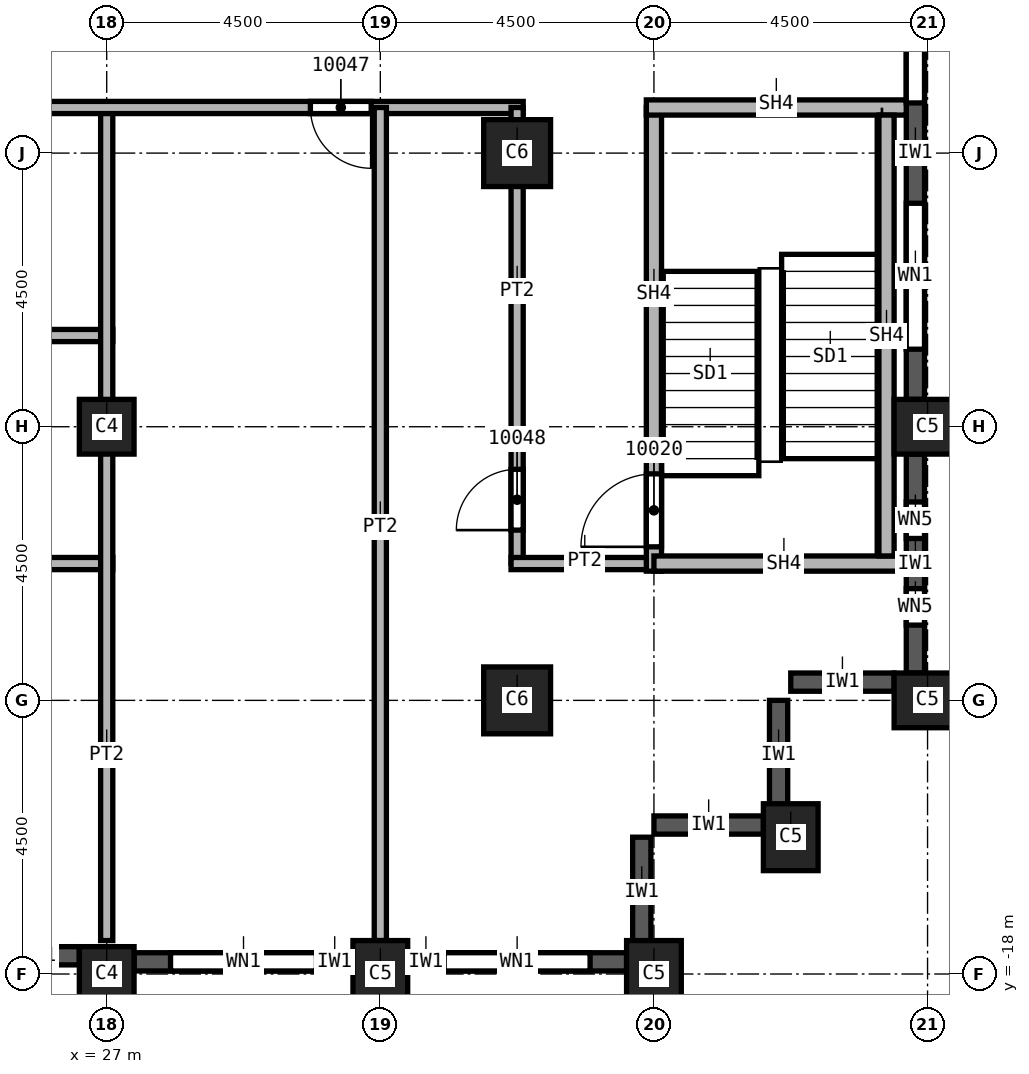
"""IFC4 building model, lengths in metres.
Left out: names, types, materials, properties, quantities, classifications, styles, units other than length and angle.
Written with IfcOpenShell. Run it as: python <this file> out.ifc"""

import sys

from ifc_helpers import new_model, si_unit, direction, frame, frame_2d, origin, origin_2d, place, context, subcontext, project, spatial, rectangle, extrude, element, fill, save


model = new_model("IFC4")
c1 = context("Model", 3, precision=1e-05, world=origin(), true_north=direction((0.0, 1.0)))
c2 = subcontext(c1, "Body", "Model", "MODEL_VIEW")
j1 = project(units=[si_unit("LENGTHUNIT", "METRE"), si_unit("PLANEANGLEUNIT", "RADIAN")], contexts=[c1])
p1 = place(None, origin())
s1 = spatial("IfcSite", under=j1, at=p1, CompositionType="ELEMENT")
p2 = place(p1, origin())
s2 = spatial("IfcBuilding", under=s1, at=p2, CompositionType="ELEMENT")
p3 = place(p2, frame((0.0, 0.0, 170.0)))
s3 = spatial("IfcBuildingStorey", under=s2, at=p3, CompositionType="ELEMENT", Elevation=170.0)
for number, where, z_axis, x_axis in (
    (1, (40.5, -9.0, 0.0), (0.0, 0.0, 1.0), (0.0, 1.0, 0.0)),
    (2, (40.5, -13.5, 0.0), (0.0, 0.0, 1.0), (0.0, 1.0, 0.0)),
    (3, (38.25, -15.75, 0.0), (0.0, 0.0, 1.0), (1.0, 0.0, 0.0)),
    (4, (31.5, -18.0, 0.0), (0.0, 0.0, 1.0), (1.0, 0.0, 0.0)),
    (5, (36.0, -18.0, 0.0), (0.0, 0.0, 1.0), (1.0, 0.0, 0.0)),
):
    element("IfcColumn", number, at=place(p3, frame(where, z_axis=z_axis, x_axis=x_axis)), inside=s3, PredefinedType="COLUMN", context=c2, shape_type="SweptSolid", body=[
        extrude(rectangle(XDim=0.9, YDim=1.1, at=origin_2d()), origin(), (0.0, 0.0, 1.0), 3.7),
    ])
for number, where, z_axis, x_axis in (
    (6, (33.75, -4.5, 0.0), (0.0, 0.0, 1.0), (1.0, 0.0, 0.0)),
    (7, (33.75, -13.5, 0.0), (0.0, 0.0, 1.0), (1.0, 0.0, 0.0)),
):
    element("IfcColumn", number, at=place(p3, frame(where, z_axis=z_axis, x_axis=x_axis)), inside=s3, PredefinedType="COLUMN", context=c2, shape_type="SweptSolid", body=[
        extrude(rectangle(XDim=1.1, YDim=1.1, at=origin_2d()), origin(), (0.0, 0.0, 1.0), 3.7),
    ])
for number, where, z_axis, x_axis in (
    (8, (27.0, -9.0, 0.0), (0.0, 0.0, 1.0), (1.0, 0.0, 0.0)),
    (9, (27.0, -18.0, 0.0), (0.0, 0.0, 1.0), (1.0, 0.0, 0.0)),
):
    element("IfcColumn", number, at=place(p3, frame(where, z_axis=z_axis, x_axis=x_axis)), inside=s3, PredefinedType="COLUMN", context=c2, shape_type="SweptSolid", body=[
        extrude(rectangle(XDim=0.9, YDim=0.9, at=origin_2d()), origin(), (0.0, 0.0, 1.0), 3.7),
    ])
for number, where, z_axis, x_axis in (
    (10, (35.8, -17.55, 0.0), (0.0, 0.0, 1.0), (0.0, 1.0, 0.0)),
    (11, (37.8, -15.55, 0.0), (0.0, 0.0, 1.0), (-1.0, 0.0, 0.0)),
    (12, (38.05, -15.3, 0.0), (0.0, 0.0, 1.0), (0.0, 1.0, 0.0)),
):
    element("IfcWall", number, at=place(p3, frame(where, z_axis=z_axis, x_axis=x_axis)), inside=s3, PredefinedType="SOLIDWALL", context=c2, shape_type="SweptSolid", body=[
        extrude(rectangle(XDim=1.8, YDim=0.3, at=frame_2d((0.9, 0.0))), origin(), (0.0, 0.0, 1.0), 3.1),
    ])
p4 = place(p3, frame((39.95, -13.2, 0.0), z_axis=(0.0, 0.0, 1.0), x_axis=(-1.0, 0.0, 0.0)))
e13 = element("IfcWall", 13, at=p4, inside=s3, PredefinedType="SOLIDWALL", context=c2, shape_type="SweptSolid", body=[
    extrude(rectangle(XDim=1.7, YDim=0.3, at=frame_2d((0.85, 0.0))), origin(), (0.0, 0.0, 1.0), 3.1),
])
p5 = place(p3, frame((25.2, -17.7, 0.0), z_axis=(0.0, 0.0, 1.0), x_axis=(1.0, 0.0, 0.0)))
e14 = element("IfcWall", 14, at=p5, inside=s3, PredefinedType="SOLIDWALL", context=c2, shape_type="SweptSolid", body=[
    extrude(rectangle(XDim=1.35, YDim=0.3, at=frame_2d((0.675, 0.0))), origin(), (0.0, 0.0, 1.0), 3.1),
])
p6 = place(p3, frame((27.45, -17.8, 0.0), z_axis=(0.0, 0.0, 1.0), x_axis=(1.0, 0.0, 0.0)))
e15 = element("IfcWall", 15, at=p6, inside=s3, PredefinedType="SOLIDWALL", context=c2, shape_type="SweptSolid", body=[
    extrude(rectangle(XDim=3.6, YDim=0.3, at=frame_2d((1.8, 0.0))), origin(), (0.0, 0.0, 1.0), 3.1),
])
p7 = place(p6, frame((0.6, 0.0, 0.8)))
e16 = element("IfcOpeningElement", 16, at=p7, cuts=e15, PredefinedType="OPENING", context=c2, shape_type="SweptSolid", body=[
    extrude(rectangle(XDim=2.4, YDim=1.95, at=frame_2d((1.2, 0.975))), frame((0.0, 0.15, 0.0), z_axis=(0.0, -1.0, 0.0), x_axis=(1.0, 0.0, 0.0)), (0.0, 0.0, 1.0), 0.3),
])
p8 = place(p3, frame((31.95, -17.8, 0.0), z_axis=(0.0, 0.0, 1.0), x_axis=(1.0, 0.0, 0.0)))
e17 = element("IfcWall", 17, at=p8, inside=s3, PredefinedType="SOLIDWALL", context=c2, shape_type="SweptSolid", body=[
    extrude(rectangle(XDim=3.6, YDim=0.3, at=frame_2d((1.8, 0.0))), origin(), (0.0, 0.0, 1.0), 3.1),
])
p9 = place(p8, frame((0.6, 0.0, 0.8)))
e18 = element("IfcOpeningElement", 18, at=p9, cuts=e17, PredefinedType="OPENING", context=c2, shape_type="SweptSolid", body=[
    extrude(rectangle(XDim=2.4, YDim=1.95, at=frame_2d((1.2, 0.975))), frame((0.0, 0.15, 0.0), z_axis=(0.0, -1.0, 0.0), x_axis=(1.0, 0.0, 0.0)), (0.0, 0.0, 1.0), 0.3),
])
p10 = place(p3, frame((40.3, -13.05, 0.0), z_axis=(0.0, 0.0, 1.0), x_axis=(0.0, 1.0, 0.0)))
e19 = element("IfcWall", 19, at=p10, inside=s3, PredefinedType="SOLIDWALL", context=c2, shape_type="SweptSolid", body=[
    extrude(rectangle(XDim=3.6, YDim=0.3, at=frame_2d((1.8, 0.0))), origin(), (0.0, 0.0, 1.0), 3.1),
])
p11 = place(p10, frame((0.788, 0.0, 0.8)))
e20 = element("IfcOpeningElement", 20, at=p11, cuts=e19, PredefinedType="OPENING", context=c2, shape_type="SweptSolid", body=[
    extrude(rectangle(XDim=0.6, YDim=1.95, at=frame_2d((0.3, 0.975))), frame((0.0, 0.15, 0.0), z_axis=(0.0, -1.0, 0.0), x_axis=(1.0, 0.0, 0.0)), (0.0, 0.0, 1.0), 0.3),
])
p12 = place(p10, frame((2.212, 0.0, 0.8)))
e21 = element("IfcOpeningElement", 21, at=p12, cuts=e19, PredefinedType="OPENING", context=c2, shape_type="SweptSolid", body=[
    extrude(rectangle(XDim=0.6, YDim=1.95, at=frame_2d((0.3, 0.975))), frame((0.0, 0.15, 0.0), z_axis=(0.0, -1.0, 0.0), x_axis=(1.0, 0.0, 0.0)), (0.0, 0.0, 1.0), 0.3),
])
p13 = place(p3, frame((40.3, -8.55, 0.0), z_axis=(0.0, 0.0, 1.0), x_axis=(0.0, 1.0, 0.0)))
e22 = element("IfcWall", 22, at=p13, inside=s3, PredefinedType="SOLIDWALL", context=c2, shape_type="SweptSolid", body=[
    extrude(rectangle(XDim=8.1, YDim=0.3, at=frame_2d((4.05, 0.0))), origin(), (0.0, 0.0, 1.0), 3.1),
])
p14 = place(p13, frame((0.825, 0.0, 0.8)))
e23 = element("IfcOpeningElement", 23, at=p14, cuts=e22, PredefinedType="OPENING", context=c2, shape_type="SweptSolid", body=[
    extrude(rectangle(XDim=2.4, YDim=1.95, at=frame_2d((1.2, 0.975))), frame((0.0, 0.15, 0.0), z_axis=(0.0, -1.0, 0.0), x_axis=(1.0, 0.0, 0.0)), (0.0, 0.0, 1.0), 0.3),
])
p15 = place(p13, frame((4.875, 0.0, 0.8)))
e24 = element("IfcOpeningElement", 24, at=p15, cuts=e22, PredefinedType="OPENING", context=c2, shape_type="SweptSolid", body=[
    extrude(rectangle(XDim=2.4, YDim=1.95, at=frame_2d((1.2, 0.975))), frame((0.0, 0.15, 0.0), z_axis=(0.0, -1.0, 0.0), x_axis=(1.0, 0.0, 0.0)), (0.0, 0.0, 1.0), 0.3),
])
for number, where, z_axis, x_axis in (
    (25, (15.4, -11.25, 0.0), (0.0, 0.0, 1.0), (1.0, 0.0, 0.0)),
    (26, (15.4, -7.5, 0.0), (0.0, 0.0, 1.0), (1.0, 0.0, 0.0)),
):
    element("IfcWall", number, at=place(p3, frame(where, z_axis=z_axis, x_axis=x_axis)), inside=s3, PredefinedType="PARTITIONING", context=c2, shape_type="SweptSolid", body=[
        extrude(rectangle(XDim=11.7, YDim=0.2, at=frame_2d((5.85, 0.0))), origin(), (0.0, 0.0, 1.0), 3.7),
    ])
p16 = place(p3, frame((27.0, -3.75, 0.0), z_axis=(0.0, 0.0, 1.0), x_axis=(0.0, -1.0, 0.0)))
e27 = element("IfcWall", 27, at=p16, inside=s3, PredefinedType="PARTITIONING", context=c2, shape_type="SweptSolid", body=[
    extrude(rectangle(XDim=13.7, YDim=0.2, at=frame_2d((6.85, 0.0))), origin(), (0.0, 0.0, 1.0), 3.7),
])
p17 = place(p3, frame((33.85, -3.75, 0.0), z_axis=(0.0, 0.0, 1.0), x_axis=(-1.0, 0.0, 0.0)))
e28 = element("IfcWall", 28, at=p17, inside=s3, PredefinedType="PARTITIONING", context=c2, shape_type="SweptSolid", body=[
    extrude(rectangle(XDim=18.45, YDim=0.2, at=frame_2d((9.225, 0.0))), origin(), (0.0, 0.0, 1.0), 3.7),
])
p18 = place(p17, frame((9.4, 0.0, 0.0)))
e29 = element("IfcOpeningElement", 29, at=p18, cuts=e28, PredefinedType="OPENING", context=c2, shape_type="SweptSolid", body=[
    extrude(rectangle(XDim=1.0, YDim=2.1, at=frame_2d((0.5, 1.05))), frame((0.0, 0.1, 0.0), z_axis=(0.0, -1.0, 0.0), x_axis=(1.0, 0.0, 0.0)), (0.0, 0.0, 1.0), 0.2),
])
p19 = place(p17, frame((2.5, 0.0, 0.0)))
e30 = element("IfcOpeningElement", 30, at=p19, cuts=e28, PredefinedType="OPENING", context=c2, shape_type="SweptSolid", body=[
    extrude(rectangle(XDim=1.0, YDim=2.1, at=frame_2d((0.5, 1.05))), frame((0.0, 0.1, 0.0), z_axis=(0.0, -1.0, 0.0), x_axis=(1.0, 0.0, 0.0)), (0.0, 0.0, 1.0), 0.2),
])
p20 = place(p3, frame((31.5, -3.75, 0.0), z_axis=(0.0, 0.0, 1.0), x_axis=(0.0, -1.0, 0.0)))
e31 = element("IfcWall", 31, at=p20, inside=s3, PredefinedType="PARTITIONING", context=c2, shape_type="SweptSolid", body=[
    extrude(rectangle(XDim=13.7, YDim=0.2, at=frame_2d((6.85, 0.0))), origin(), (0.0, 0.0, 1.0), 3.7),
])
p21 = place(p3, frame((33.75, -11.25, 0.0), z_axis=(0.0, 0.0, 1.0), x_axis=(0.0, 1.0, 0.0)))
e32 = element("IfcWall", 32, at=p21, inside=s3, PredefinedType="PARTITIONING", context=c2, shape_type="SweptSolid", body=[
    extrude(rectangle(XDim=7.5, YDim=0.2, at=frame_2d((3.75, 0.0))), origin(), (0.0, 0.0, 1.0), 3.7),
])
p22 = place(p21, frame((0.55, 0.0, 0.0)))
e33 = element("IfcOpeningElement", 33, at=p22, cuts=e32, PredefinedType="OPENING", context=c2, shape_type="SweptSolid", body=[
    extrude(rectangle(XDim=1.0, YDim=2.1, at=frame_2d((0.5, 1.05))), frame((0.0, 0.1, 0.0), z_axis=(0.0, -1.0, 0.0), x_axis=(1.0, 0.0, 0.0)), (0.0, 0.0, 1.0), 0.2),
])
p23 = place(p3, frame((36.0, -11.25, 0.0), z_axis=(0.0, 0.0, 1.0), x_axis=(-1.0, 0.0, 0.0)))
e34 = element("IfcWall", 34, at=p23, inside=s3, PredefinedType="PARTITIONING", context=c2, shape_type="SweptSolid", body=[
    extrude(rectangle(XDim=2.35, YDim=0.2, at=frame_2d((1.175, 0.0))), origin(), (0.0, 0.0, 1.0), 3.7),
])
p24 = place(p3, frame((36.0, -11.375, 0.0), z_axis=(0.0, 0.0, 1.0), x_axis=(0.0, 1.0, 0.0)))
e35 = element("IfcWall", 35, at=p24, inside=s3, PredefinedType="SOLIDWALL", context=c2, shape_type="SweptSolid", body=[
    extrude(rectangle(XDim=7.625, YDim=0.25, at=frame_2d((3.812, 0.0))), origin(), (0.0, 0.0, 1.0), 3.7),
])
p25 = place(p24, frame((0.4, 0.0, 0.0)))
e36 = element("IfcOpeningElement", 36, at=p25, cuts=e35, PredefinedType="OPENING", context=c2, shape_type="SweptSolid", body=[
    extrude(rectangle(XDim=1.2, YDim=2.1, at=frame_2d((0.6, 1.05))), frame((0.0, 0.125, 0.0), z_axis=(0.0, -1.0, 0.0), x_axis=(1.0, 0.0, 0.0)), (0.0, 0.0, 1.0), 0.25),
])
p26 = place(p3, frame((40.15, -11.25, 0.0), z_axis=(0.0, 0.0, 1.0), x_axis=(-1.0, 0.0, 0.0)))
e37 = element("IfcWall", 37, at=p26, inside=s3, PredefinedType="SOLIDWALL", context=c2, shape_type="SweptSolid", body=[
    extrude(rectangle(XDim=4.15, YDim=0.25, at=frame_2d((2.075, 0.0))), origin(), (0.0, 0.0, 1.0), 3.7),
])
p27 = place(p3, frame((40.15, -3.75, 0.0), z_axis=(0.0, 0.0, 1.0), x_axis=(-1.0, 0.0, 0.0)))
e38 = element("IfcWall", 38, at=p27, inside=s3, PredefinedType="SOLIDWALL", context=c2, shape_type="SweptSolid", body=[
    extrude(rectangle(XDim=4.275, YDim=0.25, at=frame_2d((2.137, 0.0))), origin(), (0.0, 0.0, 1.0), 3.7),
])
p28 = place(p3, frame((39.825, -11.125, 0.0), z_axis=(0.0, 0.0, 1.0), x_axis=(0.0, 1.0, 0.0)))
e39 = element("IfcWall", 39, at=p28, inside=s3, PredefinedType="SOLIDWALL", context=c2, shape_type="SweptSolid", body=[
    extrude(rectangle(XDim=7.25, YDim=0.25, at=frame_2d((3.625, 0.0))), origin(), (0.0, 0.0, 1.0), 3.7),
])
p29 = place(p7, origin())
e40 = element("IfcWindow", 40, at=p29, inside=s3, PartitioningType="SINGLE_PANEL", PredefinedType="WINDOW", context=c2, shape_type="SweptSolid", body=[
    extrude(rectangle(XDim=2.4, YDim=1.95, at=frame_2d((1.2, 0.975))), frame((0.0, 0.03, 0.0), z_axis=(0.0, -1.0, 0.0), x_axis=(1.0, 0.0, 0.0)), (0.0, 0.0, 1.0), 0.06),
])
fill(e16, e40)
p30 = place(p9, origin())
e41 = element("IfcWindow", 41, at=p30, inside=s3, PartitioningType="SINGLE_PANEL", PredefinedType="WINDOW", context=c2, shape_type="SweptSolid", body=[
    extrude(rectangle(XDim=2.4, YDim=1.95, at=frame_2d((1.2, 0.975))), frame((0.0, 0.03, 0.0), z_axis=(0.0, -1.0, 0.0), x_axis=(1.0, 0.0, 0.0)), (0.0, 0.0, 1.0), 0.06),
])
fill(e18, e41)
p31 = place(p14, origin())
e42 = element("IfcWindow", 42, at=p31, inside=s3, PartitioningType="SINGLE_PANEL", PredefinedType="WINDOW", context=c2, shape_type="SweptSolid", body=[
    extrude(rectangle(XDim=2.4, YDim=1.95, at=frame_2d((1.2, 0.975))), frame((0.0, 0.03, 0.0), z_axis=(0.0, -1.0, 0.0), x_axis=(1.0, 0.0, 0.0)), (0.0, 0.0, 1.0), 0.06),
])
fill(e23, e42)
p32 = place(p15, origin())
e43 = element("IfcWindow", 43, at=p32, inside=s3, PartitioningType="SINGLE_PANEL", PredefinedType="WINDOW", context=c2, shape_type="SweptSolid", body=[
    extrude(rectangle(XDim=2.4, YDim=1.95, at=frame_2d((1.2, 0.975))), frame((0.0, 0.03, 0.0), z_axis=(0.0, -1.0, 0.0), x_axis=(1.0, 0.0, 0.0)), (0.0, 0.0, 1.0), 0.06),
])
fill(e24, e43)
p33 = place(p25, origin())
e44 = element("IfcDoor", 44, at=p33, inside=s3, OperationType="SINGLE_SWING_LEFT", PredefinedType="DOOR", context=c2, shape_type="SweptSolid", body=[
    extrude(rectangle(XDim=1.2, YDim=2.1, at=frame_2d((0.6, 1.05))), frame((0.0, 0.025, 0.0), z_axis=(0.0, -1.0, 0.0), x_axis=(1.0, 0.0, 0.0)), (0.0, 0.0, 1.0), 0.05),
])
fill(e36, e44)
p34 = place(p19, origin())
e45 = element("IfcDoor", 45, at=p34, inside=s3, OperationType="SINGLE_SWING_RIGHT", PredefinedType="DOOR", context=c2, shape_type="SweptSolid", body=[
    extrude(rectangle(XDim=1.0, YDim=2.1, at=frame_2d((0.5, 1.05))), frame((0.0, 0.025, 0.0), z_axis=(0.0, -1.0, 0.0), x_axis=(1.0, 0.0, 0.0)), (0.0, 0.0, 1.0), 0.05),
])
fill(e30, e45)
p35 = place(p22, origin())
e46 = element("IfcDoor", 46, at=p35, inside=s3, OperationType="SINGLE_SWING_LEFT", PredefinedType="DOOR", context=c2, shape_type="SweptSolid", body=[
    extrude(rectangle(XDim=1.0, YDim=2.1, at=frame_2d((0.5, 1.05))), frame((0.0, 0.025, 0.0), z_axis=(0.0, -1.0, 0.0), x_axis=(1.0, 0.0, 0.0)), (0.0, 0.0, 1.0), 0.05),
])
fill(e33, e46)
p36 = place(p11, origin())
e47 = element("IfcWindow", 47, at=p36, inside=s3, PartitioningType="SINGLE_PANEL", PredefinedType="WINDOW", context=c2, shape_type="SweptSolid", body=[
    extrude(rectangle(XDim=0.6, YDim=1.95, at=frame_2d((0.3, 0.975))), frame((0.0, 0.03, 0.0), z_axis=(0.0, -1.0, 0.0), x_axis=(1.0, 0.0, 0.0)), (0.0, 0.0, 1.0), 0.06),
])
fill(e20, e47)
p37 = place(p12, origin())
e48 = element("IfcWindow", 48, at=p37, inside=s3, PartitioningType="SINGLE_PANEL", PredefinedType="WINDOW", context=c2, shape_type="SweptSolid", body=[
    extrude(rectangle(XDim=0.6, YDim=1.95, at=frame_2d((0.3, 0.975))), frame((0.0, 0.03, 0.0), z_axis=(0.0, -1.0, 0.0), x_axis=(1.0, 0.0, 0.0)), (0.0, 0.0, 1.0), 0.06),
])
fill(e21, e48)
save(model, sys.argv[1])
